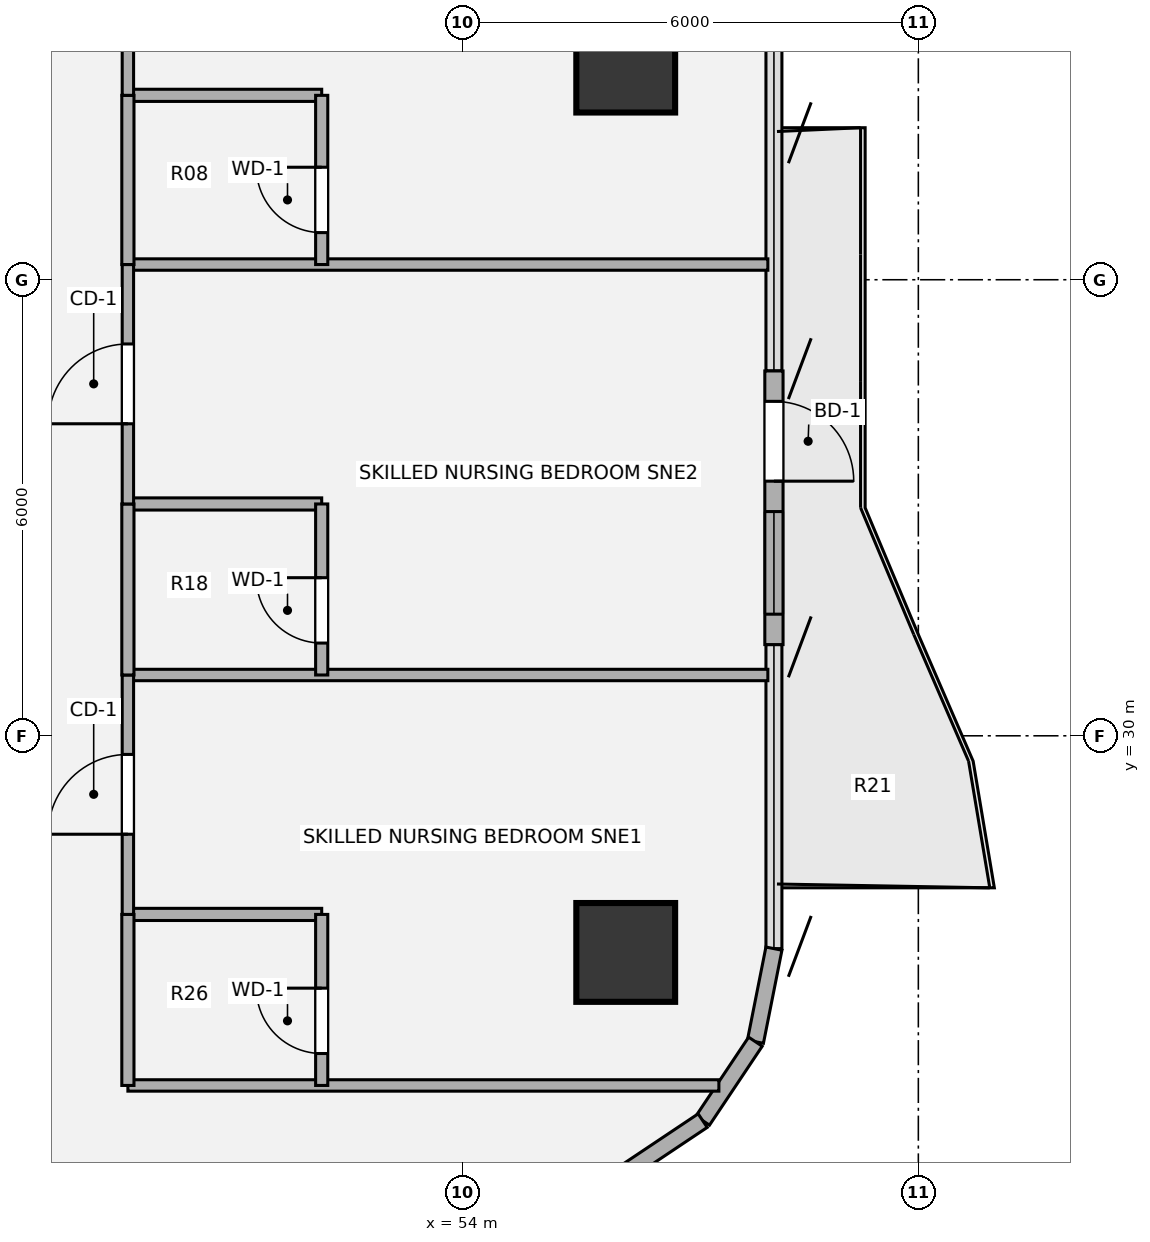
"""IFC4 building model, lengths in metres.
Left out: names, types, materials, properties, quantities, classifications, styles, units other than length and angle.
Written with IfcOpenShell. Run it as: python <this file> out.ifc"""

import sys

from ifc_helpers import new_model, si_unit, direction, frame, frame_2d, origin, origin_2d, place, context, subcontext, project, spatial, rectangle, hollow_circle, extrude, source, transform, mapped, element, fill, save


model = new_model("IFC4")
c1 = context("Model", 3, precision=1e-05, world=origin(), true_north=direction((0.0, 1.0)))
c2 = subcontext(c1, "Body", "Model", "MODEL_VIEW")
j1 = project(units=[si_unit("LENGTHUNIT", "METRE"), si_unit("PLANEANGLEUNIT", "RADIAN")], contexts=[c1])
p1 = place(None, origin())
s1 = spatial("IfcSite", under=j1, at=p1, CompositionType="ELEMENT")
p2 = place(p1, origin())
s2 = spatial("IfcBuilding", under=s1, at=p2, CompositionType="ELEMENT")
p3 = place(p2, frame((0.0, 0.0, 131.4)))
s3 = spatial("IfcBuildingStorey", under=s2, at=p3, CompositionType="ELEMENT", Elevation=131.4)
m1 = source(origin(), c2, "Body", "SweptSolid", [
    extrude(hollow_circle(Radius=0.65, WallThickness=0.045, at=origin_2d()), origin(), (0.0, 0.0, 1.0), 3.78),
])
for number, where, z_axis, x_axis in (
    (1, (56.15, 27.15, 0.0), (0.0, 0.0, 1.0), (1.0, 0.0, 0.0)),
    (2, (56.15, 38.85, 0.0), (0.0, 0.0, 1.0), (1.0, 0.0, 0.0)),
):
    element("IfcColumn", number, at=place(p3, frame(where, z_axis=z_axis, x_axis=x_axis)), inside=s3, PredefinedType="COLUMN", context=c2, shape_type="MappedRepresentation", body=[
        mapped(m1, transform((0.0, 0.0, 0.0), x_axis=(1.0, 0.0, 0.0), y_axis=(0.0, 1.0, 0.0), z_axis=(0.0, 0.0, 1.0), scale=1.0)),
    ])
p4 = place(p3, frame((58.1, 34.8, 0.0), z_axis=(0.0, 0.0, 1.0), x_axis=(0.0, -1.0, 0.0)))
e3 = element("IfcWall", 3, at=p4, inside=s3, PredefinedType="SOLIDWALL", context=c2, shape_type="SweptSolid", body=[
    extrude(rectangle(XDim=3.6, YDim=0.24, at=frame_2d((1.8, 0.0))), origin(), (0.0, 0.0, 1.0), 3.53),
])
p5 = place(p4, frame((0.4, 0.0, 0.0)))
e4 = element("IfcOpeningElement", 4, at=p5, cuts=e3, PredefinedType="OPENING", context=c2, shape_type="SweptSolid", body=[
    extrude(rectangle(XDim=1.05, YDim=2.15, at=origin_2d()), frame((0.525, 0.13, 1.075), z_axis=(0.0, -1.0, 0.0), x_axis=(1.0, 0.0, 0.0)), (0.0, 0.0, 1.0), 0.26),
])
p6 = place(p4, frame((1.85, 0.0, 0.85)))
e5 = element("IfcOpeningElement", 5, at=p6, cuts=e3, PredefinedType="OPENING", context=c2, shape_type="SweptSolid", body=[
    extrude(rectangle(XDim=1.35, YDim=1.35, at=origin_2d()), frame((0.675, 0.13, 0.675), z_axis=(0.0, -1.0, 0.0), x_axis=(1.0, 0.0, 0.0)), (0.0, 0.0, 1.0), 0.26),
])
for number, where, z_axis, x_axis in (
    (6, (58.1, 27.2, 0.0), (0.0, 0.0, 1.0), (-0.195, -0.981, 0.0)),
    (7, (57.856, 25.975, 0.0), (0.0, 0.0, 1.0), (-0.556, -0.831, 0.0)),
    (8, (57.163, 24.937, 0.0), (0.0, 0.0, 1.0), (-0.831, -0.556, 0.0)),
):
    element("IfcWall", number, at=place(p3, frame(where, z_axis=z_axis, x_axis=x_axis)), inside=s3, PredefinedType="SOLIDWALL", context=c2, shape_type="SweptSolid", body=[
        extrude(rectangle(XDim=1.249, YDim=0.215, at=frame_2d((0.624, 0.0))), origin(), (0.0, 0.0, 1.0), 3.53),
    ])
p7 = place(p3, frame((49.6, 25.4, 0.0), z_axis=(0.0, 0.0, 1.0), x_axis=(1.0, 0.0, 0.0)))
e9 = element("IfcWall", 9, at=p7, inside=s3, PredefinedType="PARTITIONING", context=c2, shape_type="SweptSolid", body=[
    extrude(rectangle(XDim=7.776, YDim=0.15, at=frame_2d((3.888, 0.0))), origin(), (0.0, 0.0, 1.0), 3.5),
])
p8 = place(p3, frame((49.6, 27.65, 0.0), z_axis=(0.0, 0.0, 1.0), x_axis=(1.0, 0.0, 0.0)))
e10 = element("IfcWall", 10, at=p8, inside=s3, PredefinedType="PLUMBINGWALL", context=c2, shape_type="SweptSolid", body=[
    extrude(rectangle(XDim=2.55, YDim=0.16, at=frame_2d((1.275, 0.0))), origin(), (0.0, 0.0, 1.0), 2.982),
])
p9 = place(p3, frame((49.6, 30.8, 0.0), z_axis=(0.0, 0.0, 1.0), x_axis=(1.0, 0.0, 0.0)))
e11 = element("IfcWall", 11, at=p9, inside=s3, PredefinedType="PARTITIONING", context=c2, shape_type="SweptSolid", body=[
    extrude(rectangle(XDim=8.42, YDim=0.15, at=frame_2d((4.21, 0.0))), origin(), (0.0, 0.0, 1.0), 2.982),
])
p10 = place(p3, frame((49.6, 33.05, 0.0), z_axis=(0.0, 0.0, 1.0), x_axis=(1.0, 0.0, 0.0)))
e12 = element("IfcWall", 12, at=p10, inside=s3, PredefinedType="PLUMBINGWALL", context=c2, shape_type="SweptSolid", body=[
    extrude(rectangle(XDim=2.55, YDim=0.16, at=frame_2d((1.275, 0.0))), origin(), (0.0, 0.0, 1.0), 2.982),
])
p11 = place(p3, frame((49.6, 36.2, 0.0), z_axis=(0.0, 0.0, 1.0), x_axis=(1.0, 0.0, 0.0)))
e13 = element("IfcWall", 13, at=p11, inside=s3, PredefinedType="PARTITIONING", context=c2, shape_type="SweptSolid", body=[
    extrude(rectangle(XDim=8.42, YDim=0.15, at=frame_2d((4.21, 0.0))), origin(), (0.0, 0.0, 1.0), 2.982),
])
p12 = place(p3, frame((49.6, 38.426, 0.0), z_axis=(0.0, 0.0, 1.0), x_axis=(1.0, 0.0, 0.0)))
e14 = element("IfcWall", 14, at=p12, inside=s3, PredefinedType="PLUMBINGWALL", context=c2, shape_type="SweptSolid", body=[
    extrude(rectangle(XDim=2.55, YDim=0.16, at=frame_2d((1.275, 0.0))), origin(), (0.0, 0.0, 1.0), 3.055),
])
p13 = place(p3, frame((49.6, 25.4, 0.0), z_axis=(0.0, 0.0, 1.0), x_axis=(0.0, 1.0, 0.0)))
e15 = element("IfcWall", 15, at=p13, inside=s3, PredefinedType="PLUMBINGWALL", context=c2, shape_type="SweptSolid", body=[
    extrude(rectangle(XDim=2.25, YDim=0.16, at=frame_2d((1.125, 0.0))), origin(), (0.0, 0.0, 1.0), 3.5),
])
p14 = place(p3, frame((49.6, 27.65, 0.0), z_axis=(0.0, 0.0, 1.0), x_axis=(0.0, 1.0, 0.0)))
e16 = element("IfcWall", 16, at=p14, inside=s3, PredefinedType="PARTITIONING", context=c2, shape_type="SweptSolid", body=[
    extrude(rectangle(XDim=3.15, YDim=0.15, at=frame_2d((1.575, 0.0))), origin(), (0.0, 0.0, 1.0), 3.5),
])
p15 = place(p14, frame((1.055, 0.0, 0.0)))
e17 = element("IfcOpeningElement", 17, at=p15, cuts=e16, PredefinedType="OPENING", context=c2, shape_type="SweptSolid", body=[
    extrude(rectangle(XDim=1.05, YDim=2.1, at=origin_2d()), frame((0.525, 0.085, 1.05), z_axis=(0.0, -1.0, 0.0), x_axis=(1.0, 0.0, 0.0)), (0.0, 0.0, 1.0), 0.17),
])
p16 = place(p3, frame((49.6, 30.8, 0.0), z_axis=(0.0, 0.0, 1.0), x_axis=(0.0, 1.0, 0.0)))
e18 = element("IfcWall", 18, at=p16, inside=s3, PredefinedType="PLUMBINGWALL", context=c2, shape_type="SweptSolid", body=[
    extrude(rectangle(XDim=2.25, YDim=0.16, at=frame_2d((1.125, 0.0))), origin(), (0.0, 0.0, 1.0), 3.5),
])
p17 = place(p3, frame((49.6, 33.05, 0.0), z_axis=(0.0, 0.0, 1.0), x_axis=(0.0, 1.0, 0.0)))
e19 = element("IfcWall", 19, at=p17, inside=s3, PredefinedType="PARTITIONING", context=c2, shape_type="SweptSolid", body=[
    extrude(rectangle(XDim=3.15, YDim=0.15, at=frame_2d((1.575, 0.0))), origin(), (0.0, 0.0, 1.0), 3.5),
])
p18 = place(p17, frame((1.055, 0.0, 0.0)))
e20 = element("IfcOpeningElement", 20, at=p18, cuts=e19, PredefinedType="OPENING", context=c2, shape_type="SweptSolid", body=[
    extrude(rectangle(XDim=1.05, YDim=2.1, at=origin_2d()), frame((0.525, 0.085, 1.05), z_axis=(0.0, -1.0, 0.0), x_axis=(1.0, 0.0, 0.0)), (0.0, 0.0, 1.0), 0.17),
])
p19 = place(p3, frame((49.6, 36.2, 0.0), z_axis=(0.0, 0.0, 1.0), x_axis=(0.0, 1.0, 0.0)))
e21 = element("IfcWall", 21, at=p19, inside=s3, PredefinedType="PLUMBINGWALL", context=c2, shape_type="SweptSolid", body=[
    extrude(rectangle(XDim=2.226, YDim=0.16, at=frame_2d((1.113, 0.0))), origin(), (0.0, 0.0, 1.0), 3.5),
])
p20 = place(p3, frame((49.6, 38.426, 0.0), z_axis=(0.0, 0.0, 1.0), x_axis=(0.0, 1.0, 0.0)))
e22 = element("IfcWall", 22, at=p20, inside=s3, PredefinedType="PARTITIONING", context=c2, shape_type="SweptSolid", body=[
    extrude(rectangle(XDim=3.074, YDim=0.15, at=frame_2d((1.537, 0.0))), origin(), (0.0, 0.0, 1.0), 3.5),
])
p21 = place(p20, frame((1.017, 0.0, 0.0)))
e23 = element("IfcOpeningElement", 23, at=p21, cuts=e22, PredefinedType="OPENING", context=c2, shape_type="SweptSolid", body=[
    extrude(rectangle(XDim=1.05, YDim=2.1, at=origin_2d()), frame((0.525, 0.085, 1.05), z_axis=(0.0, -1.0, 0.0), x_axis=(1.0, 0.0, 0.0)), (0.0, 0.0, 1.0), 0.17),
])
p22 = place(p3, frame((52.15, 25.4, 0.0), z_axis=(0.0, 0.0, 1.0), x_axis=(0.0, 1.0, 0.0)))
e24 = element("IfcWall", 24, at=p22, inside=s3, PredefinedType="PLUMBINGWALL", context=c2, shape_type="SweptSolid", body=[
    extrude(rectangle(XDim=2.25, YDim=0.16, at=frame_2d((1.125, 0.0))), origin(), (0.0, 0.0, 1.0), 3.5),
])
p23 = place(p22, frame((0.42, 0.0, 0.0)))
e25 = element("IfcOpeningElement", 25, at=p23, cuts=e24, PredefinedType="OPENING", context=c2, shape_type="SweptSolid", body=[
    extrude(rectangle(XDim=0.86, YDim=2.1, at=origin_2d()), frame((0.43, 0.09, 1.05), z_axis=(0.0, -1.0, 0.0), x_axis=(1.0, 0.0, 0.0)), (0.0, 0.0, 1.0), 0.18),
])
p24 = place(p3, frame((52.15, 30.8, 0.0), z_axis=(0.0, 0.0, 1.0), x_axis=(0.0, 1.0, 0.0)))
e26 = element("IfcWall", 26, at=p24, inside=s3, PredefinedType="PLUMBINGWALL", context=c2, shape_type="SweptSolid", body=[
    extrude(rectangle(XDim=2.25, YDim=0.16, at=frame_2d((1.125, 0.0))), origin(), (0.0, 0.0, 1.0), 3.5),
])
p25 = place(p24, frame((0.42, 0.0, 0.0)))
e27 = element("IfcOpeningElement", 27, at=p25, cuts=e26, PredefinedType="OPENING", context=c2, shape_type="SweptSolid", body=[
    extrude(rectangle(XDim=0.86, YDim=2.1, at=origin_2d()), frame((0.43, 0.09, 1.05), z_axis=(0.0, -1.0, 0.0), x_axis=(1.0, 0.0, 0.0)), (0.0, 0.0, 1.0), 0.18),
])
p26 = place(p3, frame((52.15, 36.2, 0.0), z_axis=(0.0, 0.0, 1.0), x_axis=(0.0, 1.0, 0.0)))
e28 = element("IfcWall", 28, at=p26, inside=s3, PredefinedType="PLUMBINGWALL", context=c2, shape_type="SweptSolid", body=[
    extrude(rectangle(XDim=2.226, YDim=0.16, at=frame_2d((1.113, 0.0))), origin(), (0.0, 0.0, 1.0), 3.5),
])
p27 = place(p26, frame((0.42, 0.0, 0.0)))
e29 = element("IfcOpeningElement", 29, at=p27, cuts=e28, PredefinedType="OPENING", context=c2, shape_type="SweptSolid", body=[
    extrude(rectangle(XDim=0.86, YDim=2.1, at=origin_2d()), frame((0.43, 0.09, 1.05), z_axis=(0.0, -1.0, 0.0), x_axis=(1.0, 0.0, 0.0)), (0.0, 0.0, 1.0), 0.18),
])
m2 = source(origin(), c2, "Body", "SweptSolid", [
    extrude(rectangle(XDim=1.05, YDim=2.15, at=origin_2d()), frame((0.525, 0.025, 1.075), z_axis=(0.0, -1.0, 0.0), x_axis=(1.0, 0.0, 0.0)), (0.0, 0.0, 1.0), 0.05),
])
p28 = place(p5, origin())
e30 = element("IfcDoor", 30, at=p28, inside=s3, OperationType="SINGLE_SWING_RIGHT", PredefinedType="DOOR", context=c2, shape_type="MappedRepresentation", body=[
    mapped(m2, transform((0.0, 0.0, 0.0), x_axis=(1.0, 0.0, 0.0), y_axis=(0.0, 1.0, 0.0), z_axis=(0.0, 0.0, 1.0), scale=1.0)),
])
fill(e4, e30)
m3 = source(origin(), c2, "Body", "SweptSolid", [
    extrude(rectangle(XDim=1.35, YDim=1.35, at=origin_2d()), frame((0.675, 0.03, 0.675), z_axis=(0.0, -1.0, 0.0), x_axis=(1.0, 0.0, 0.0)), (0.0, 0.0, 1.0), 0.06),
])
p29 = place(p6, origin())
e31 = element("IfcWindow", 31, at=p29, inside=s3, PartitioningType="SINGLE_PANEL", PredefinedType="WINDOW", context=c2, shape_type="MappedRepresentation", body=[
    mapped(m3, transform((0.0, 0.0, 0.0), x_axis=(1.0, 0.0, 0.0), y_axis=(0.0, 1.0, 0.0), z_axis=(0.0, 0.0, 1.0), scale=1.0)),
])
fill(e5, e31)
m4 = source(origin(), c2, "Body", "SweptSolid", [
    extrude(rectangle(XDim=1.05, YDim=2.1, at=origin_2d()), frame((0.525, 0.025, 1.05), z_axis=(0.0, -1.0, 0.0), x_axis=(1.0, 0.0, 0.0)), (0.0, 0.0, 1.0), 0.05),
])
p30 = place(p15, origin())
e32 = element("IfcDoor", 32, at=p30, inside=s3, OperationType="SINGLE_SWING_LEFT", PredefinedType="DOOR", context=c2, shape_type="MappedRepresentation", body=[
    mapped(m4, transform((0.0, 0.0, 0.0), x_axis=(1.0, 0.0, 0.0), y_axis=(0.0, 1.0, 0.0), z_axis=(0.0, 0.0, 1.0), scale=1.0)),
])
fill(e17, e32)
p31 = place(p18, origin())
e33 = element("IfcDoor", 33, at=p31, inside=s3, OperationType="SINGLE_SWING_LEFT", PredefinedType="DOOR", context=c2, shape_type="MappedRepresentation", body=[
    mapped(m4, transform((0.0, 0.0, 0.0), x_axis=(1.0, 0.0, 0.0), y_axis=(0.0, 1.0, 0.0), z_axis=(0.0, 0.0, 1.0), scale=1.0)),
])
fill(e20, e33)
m5 = source(origin(), c2, "Body", "SweptSolid", [
    extrude(rectangle(XDim=0.86, YDim=2.1, at=origin_2d()), frame((0.43, 0.025, 1.05), z_axis=(0.0, -1.0, 0.0), x_axis=(1.0, 0.0, 0.0)), (0.0, 0.0, 1.0), 0.05),
])
p32 = place(p23, origin())
e34 = element("IfcDoor", 34, at=p32, inside=s3, OperationType="SINGLE_SWING_RIGHT", PredefinedType="DOOR", context=c2, shape_type="MappedRepresentation", body=[
    mapped(m5, transform((0.0, 0.0, 0.0), x_axis=(1.0, 0.0, 0.0), y_axis=(0.0, 1.0, 0.0), z_axis=(0.0, 0.0, 1.0), scale=1.0)),
])
fill(e25, e34)
p33 = place(p25, origin())
e35 = element("IfcDoor", 35, at=p33, inside=s3, OperationType="SINGLE_SWING_RIGHT", PredefinedType="DOOR", context=c2, shape_type="MappedRepresentation", body=[
    mapped(m5, transform((0.0, 0.0, 0.0), x_axis=(1.0, 0.0, 0.0), y_axis=(0.0, 1.0, 0.0), z_axis=(0.0, 0.0, 1.0), scale=1.0)),
])
fill(e27, e35)
p34 = place(p27, origin())
e36 = element("IfcDoor", 36, at=p34, inside=s3, OperationType="SINGLE_SWING_RIGHT", PredefinedType="DOOR", context=c2, shape_type="MappedRepresentation", body=[
    mapped(m5, transform((0.0, 0.0, 0.0), x_axis=(1.0, 0.0, 0.0), y_axis=(0.0, 1.0, 0.0), z_axis=(0.0, 0.0, 1.0), scale=1.0)),
])
fill(e29, e36)
save(model, sys.argv[1])
